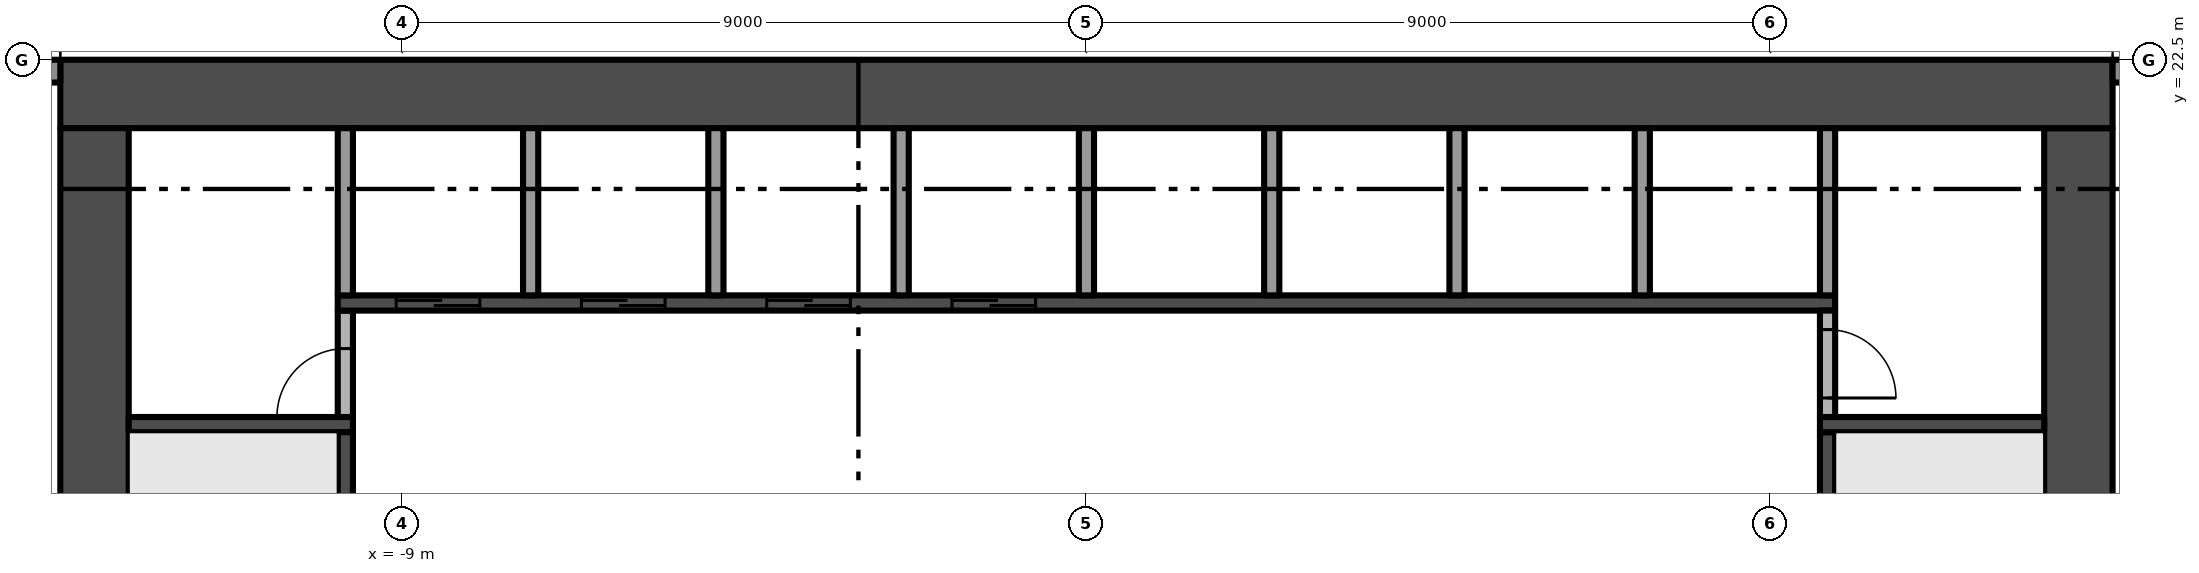
"""IFC4 building model, lengths in metres.
Left out: names, types, materials, properties, quantities, classifications, styles, units other than length and angle.
Written with IfcOpenShell. Run it as: python <this file> out.ifc"""

import sys

from ifc_helpers import new_model, si_unit, direction, frame, frame_2d, origin, place, context, subcontext, project, spatial, rectangle, extrude, element, fill, save


model = new_model("IFC4")
c1 = context("Model", 3, precision=1e-05, world=origin(), true_north=direction((0.0, 1.0)))
c2 = subcontext(c1, "Body", "Model", "MODEL_VIEW")
j1 = project(units=[si_unit("LENGTHUNIT", "METRE"), si_unit("PLANEANGLEUNIT", "RADIAN")], contexts=[c1])
p1 = place(None, origin())
s1 = spatial("IfcSite", under=j1, at=p1, CompositionType="ELEMENT")
p2 = place(p1, origin())
s2 = spatial("IfcBuilding", under=s1, at=p2, CompositionType="ELEMENT")
p3 = place(p2, frame((0.0, 0.0, 80.8)))
s3 = spatial("IfcBuildingStorey", under=s2, at=p3, CompositionType="ELEMENT", Elevation=80.8)
p4 = place(p3, frame((13.05, 5.4, -0.3), z_axis=(0.0, 0.0, 1.0), x_axis=(0.0, 1.0, 0.0)))
e1 = element("IfcWall", 1, at=p4, inside=s3, PredefinedType="SHEAR", context=c2, shape_type="SweptSolid", body=[
    extrude(rectangle(XDim=16.2, YDim=0.9, at=frame_2d((8.1, 0.0))), origin(), (0.0, 0.0, 1.0), 3.8),
])
p5 = place(p4, frame((6.0, 0.0, 0.3)))
e2 = element("IfcOpeningElement", 2, at=p5, cuts=e1, PredefinedType="OPENING", context=c2, shape_type="SweptSolid", body=[
    extrude(rectangle(XDim=1.2, YDim=2.2, at=frame_2d((0.6, 1.1))), frame((0.0, 0.46, 0.0), z_axis=(0.0, -1.0, 0.0), x_axis=(1.0, 0.0, 0.0)), (0.0, 0.0, 1.0), 0.92),
])
p6 = place(p3, frame((13.5, 22.05, -0.3), z_axis=(0.0, 0.0, 1.0), x_axis=(-1.0, 0.0, 0.0)))
e3 = element("IfcWall", 3, at=p6, inside=s3, PredefinedType="SHEAR", context=c2, shape_type="SweptSolid", body=[
    extrude(rectangle(XDim=27.0, YDim=0.9, at=frame_2d((13.5, 0.0))), origin(), (0.0, 0.0, 1.0), 3.8),
])
p7 = place(p3, frame((-13.05, 21.6, -0.3), z_axis=(0.0, 0.0, 1.0), x_axis=(0.0, -1.0, 0.0)))
e4 = element("IfcWall", 4, at=p7, inside=s3, PredefinedType="SHEAR", context=c2, shape_type="SweptSolid", body=[
    extrude(rectangle(XDim=16.2, YDim=0.9, at=frame_2d((8.1, 0.0))), origin(), (0.0, 0.0, 1.0), 3.8),
])
p8 = place(p7, frame((9.0, 0.0, 0.3)))
e5 = element("IfcOpeningElement", 5, at=p8, cuts=e4, PredefinedType="OPENING", context=c2, shape_type="SweptSolid", body=[
    extrude(rectangle(XDim=1.2, YDim=2.2, at=frame_2d((0.6, 1.1))), frame((0.0, 0.46, 0.0), z_axis=(0.0, -1.0, 0.0), x_axis=(1.0, 0.0, 0.0)), (0.0, 0.0, 1.0), 0.92),
])
p9 = place(p3, frame((13.5, 22.35, 0.0), z_axis=(0.0, 0.0, 1.0), x_axis=(1.0, 0.0, 0.0)))
e6 = element("IfcWall", 6, at=p9, inside=s3, PredefinedType="SOLIDWALL", context=c2, shape_type="SweptSolid", body=[
    extrude(rectangle(XDim=3.85, YDim=0.3, at=frame_2d((1.925, 0.0))), origin(), (0.0, 0.0, 1.0), 3.5),
])
p10 = place(p9, frame((0.775, 0.0, 0.45)))
e7 = element("IfcOpeningElement", 7, at=p10, cuts=e6, PredefinedType="OPENING", context=c2, shape_type="SweptSolid", body=[
    extrude(rectangle(XDim=2.775, YDim=2.65, at=frame_2d((1.387, 1.325))), frame((0.0, 0.16, 0.0), z_axis=(0.0, -1.0, 0.0), x_axis=(1.0, 0.0, 0.0)), (0.0, 0.0, 1.0), 0.32),
])
p11 = place(p3, frame((-17.35, 22.35, 0.0), z_axis=(0.0, 0.0, 1.0), x_axis=(1.0, 0.0, 0.0)))
e8 = element("IfcWall", 8, at=p11, inside=s3, PredefinedType="SOLIDWALL", context=c2, shape_type="SweptSolid", body=[
    extrude(rectangle(XDim=3.85, YDim=0.3, at=frame_2d((1.925, 0.0))), origin(), (0.0, 0.0, 1.0), 3.5),
])
p12 = place(p11, frame((0.3, 0.0, 0.0)))
e9 = element("IfcOpeningElement", 9, at=p12, cuts=e8, PredefinedType="OPENING", context=c2, shape_type="SweptSolid", body=[
    extrude(rectangle(XDim=2.775, YDim=2.4, at=frame_2d((1.387, 1.2))), frame((0.0, 0.16, 0.0), z_axis=(0.0, -1.0, 0.0), x_axis=(1.0, 0.0, 0.0)), (0.0, 0.0, 1.0), 0.32),
])
p13 = place(p3, frame((-12.6, 17.7, 0.0), z_axis=(0.0, 0.0, 1.0), x_axis=(1.0, 0.0, 0.0)))
e10 = element("IfcWall", 10, at=p13, inside=s3, PredefinedType="SHEAR", context=c2, shape_type="SweptSolid", body=[
    extrude(rectangle(XDim=2.95, YDim=0.2, at=frame_2d((1.475, 0.0))), origin(), (0.0, 0.0, 1.0), 3.5),
])
p14 = place(p3, frame((-9.75, 16.1, 0.0), z_axis=(0.0, 0.0, 1.0), x_axis=(0.0, 1.0, 0.0)))
e11 = element("IfcWall", 11, at=p14, inside=s3, PredefinedType="SHEAR", context=c2, shape_type="SweptSolid", body=[
    extrude(rectangle(XDim=1.5, YDim=0.2, at=frame_2d((0.75, 0.0))), origin(), (0.0, 0.0, 1.0), 3.5),
])
p15 = place(p3, frame((-9.75, 17.8, 0.0), z_axis=(0.0, 0.0, 1.0), x_axis=(0.0, 1.0, 0.0)))
e12 = element("IfcWall", 12, at=p15, inside=s3, PredefinedType="PARTITIONING", context=c2, shape_type="SweptSolid", body=[
    extrude(rectangle(XDim=1.4, YDim=0.2, at=frame_2d((0.7, 0.0))), origin(), (0.0, 0.0, 1.0), 3.5),
])
p16 = place(p15, origin())
e13 = element("IfcOpeningElement", 13, at=p16, cuts=e12, PredefinedType="OPENING", context=c2, shape_type="SweptSolid", body=[
    extrude(rectangle(XDim=0.9, YDim=2.1, at=frame_2d((0.45, 1.05))), frame((0.0, 0.11, 0.0), z_axis=(0.0, -1.0, 0.0), x_axis=(1.0, 0.0, 0.0)), (0.0, 0.0, 1.0), 0.22),
])
p17 = place(p3, frame((-9.85, 19.3, 0.0), z_axis=(0.0, 0.0, 1.0), x_axis=(1.0, 0.0, 0.0)))
e14 = element("IfcWall", 14, at=p17, inside=s3, PredefinedType="SHEAR", context=c2, shape_type="SweptSolid", body=[
    extrude(rectangle(XDim=19.7, YDim=0.2, at=frame_2d((9.85, 0.0))), origin(), (0.0, 0.0, 1.0), 3.5),
])
p18 = place(p17, frame((0.769, 0.0, 0.0)))
e15 = element("IfcOpeningElement", 15, at=p18, cuts=e14, PredefinedType="OPENING", context=c2, shape_type="SweptSolid", body=[
    extrude(rectangle(XDim=1.1, YDim=2.1, at=frame_2d((0.55, 1.05))), frame((0.0, 0.11, 0.0), z_axis=(0.0, -1.0, 0.0), x_axis=(1.0, 0.0, 0.0)), (0.0, 0.0, 1.0), 0.22),
])
p19 = place(p17, frame((3.206, 0.0, 0.0)))
e16 = element("IfcOpeningElement", 16, at=p19, cuts=e14, PredefinedType="OPENING", context=c2, shape_type="SweptSolid", body=[
    extrude(rectangle(XDim=1.1, YDim=2.1, at=frame_2d((0.55, 1.05))), frame((0.0, 0.11, 0.0), z_axis=(0.0, -1.0, 0.0), x_axis=(1.0, 0.0, 0.0)), (0.0, 0.0, 1.0), 0.22),
])
p20 = place(p17, frame((5.644, 0.0, 0.0)))
e17 = element("IfcOpeningElement", 17, at=p20, cuts=e14, PredefinedType="OPENING", context=c2, shape_type="SweptSolid", body=[
    extrude(rectangle(XDim=1.1, YDim=2.1, at=frame_2d((0.55, 1.05))), frame((0.0, 0.11, 0.0), z_axis=(0.0, -1.0, 0.0), x_axis=(1.0, 0.0, 0.0)), (0.0, 0.0, 1.0), 0.22),
])
p21 = place(p17, frame((8.081, 0.0, 0.0)))
e18 = element("IfcOpeningElement", 18, at=p21, cuts=e14, PredefinedType="OPENING", context=c2, shape_type="SweptSolid", body=[
    extrude(rectangle(XDim=1.1, YDim=2.1, at=frame_2d((0.55, 1.05))), frame((0.0, 0.11, 0.0), z_axis=(0.0, -1.0, 0.0), x_axis=(1.0, 0.0, 0.0)), (0.0, 0.0, 1.0), 0.22),
])
for number, where, z_axis, x_axis in (
    (19, (-9.75, 19.4, 0.0), (0.0, 0.0, 1.0), (0.0, 1.0, 0.0)),
    (20, (-7.312, 19.4, 0.0), (0.0, 0.0, 1.0), (0.0, 1.0, 0.0)),
    (21, (-4.875, 19.4, 0.0), (0.0, 0.0, 1.0), (0.0, 1.0, 0.0)),
    (22, (-2.438, 19.4, 0.0), (0.0, 0.0, 1.0), (0.0, 1.0, 0.0)),
    (23, (0.0, 19.4, 0.0), (0.0, 0.0, 1.0), (0.0, 1.0, 0.0)),
    (24, (2.438, 19.4, 0.0), (0.0, 0.0, 1.0), (0.0, 1.0, 0.0)),
    (25, (4.875, 19.4, 0.0), (0.0, 0.0, 1.0), (0.0, 1.0, 0.0)),
    (26, (7.312, 19.4, 0.0), (0.0, 0.0, 1.0), (0.0, 1.0, 0.0)),
):
    element("IfcWall", number, at=place(p3, frame(where, z_axis=z_axis, x_axis=x_axis)), inside=s3, PredefinedType="PARTITIONING", context=c2, shape_type="SweptSolid", body=[
        extrude(rectangle(XDim=2.2, YDim=0.2, at=frame_2d((1.1, 0.0))), origin(), (0.0, 0.0, 1.0), 3.5),
    ])
p22 = place(p3, frame((9.75, 16.1, 0.0), z_axis=(0.0, 0.0, 1.0), x_axis=(0.0, 1.0, 0.0)))
e27 = element("IfcWall", 27, at=p22, inside=s3, PredefinedType="SHEAR", context=c2, shape_type="SweptSolid", body=[
    extrude(rectangle(XDim=1.5, YDim=0.2, at=frame_2d((0.75, 0.0))), origin(), (0.0, 0.0, 1.0), 3.5),
])
p23 = place(p3, frame((9.65, 17.7, 0.0), z_axis=(0.0, 0.0, 1.0), x_axis=(1.0, 0.0, 0.0)))
e28 = element("IfcWall", 28, at=p23, inside=s3, PredefinedType="SHEAR", context=c2, shape_type="SweptSolid", body=[
    extrude(rectangle(XDim=2.95, YDim=0.2, at=frame_2d((1.475, 0.0))), origin(), (0.0, 0.0, 1.0), 3.5),
])
p24 = place(p3, frame((9.75, 19.2, 0.0), z_axis=(0.0, 0.0, 1.0), x_axis=(0.0, -1.0, 0.0)))
e29 = element("IfcWall", 29, at=p24, inside=s3, PredefinedType="PARTITIONING", context=c2, shape_type="SweptSolid", body=[
    extrude(rectangle(XDim=1.4, YDim=0.2, at=frame_2d((0.7, 0.0))), origin(), (0.0, 0.0, 1.0), 3.5),
])
p25 = place(p24, frame((0.25, 0.0, 0.0)))
e30 = element("IfcOpeningElement", 30, at=p25, cuts=e29, PredefinedType="OPENING", context=c2, shape_type="SweptSolid", body=[
    extrude(rectangle(XDim=0.9, YDim=2.1, at=frame_2d((0.45, 1.05))), frame((0.0, 0.11, 0.0), z_axis=(0.0, -1.0, 0.0), x_axis=(1.0, 0.0, 0.0)), (0.0, 0.0, 1.0), 0.22),
])
p26 = place(p3, frame((9.75, 19.4, 0.0), z_axis=(0.0, 0.0, 1.0), x_axis=(0.0, 1.0, 0.0)))
e31 = element("IfcWall", 31, at=p26, inside=s3, PredefinedType="PARTITIONING", context=c2, shape_type="SweptSolid", body=[
    extrude(rectangle(XDim=2.2, YDim=0.2, at=frame_2d((1.1, 0.0))), origin(), (0.0, 0.0, 1.0), 3.5),
])
p27 = place(p18, origin())
e32 = element("IfcDoor", 32, at=p27, inside=s3, OperationType="SLIDING_TO_LEFT", PredefinedType="DOOR", context=c2, shape_type="SweptSolid", body=[
    extrude(rectangle(XDim=1.1, YDim=2.1, at=frame_2d((0.55, 1.05))), frame((0.0, 0.025, 0.0), z_axis=(0.0, -1.0, 0.0), x_axis=(1.0, 0.0, 0.0)), (0.0, 0.0, 1.0), 0.05),
])
fill(e15, e32)
p28 = place(p19, origin())
e33 = element("IfcDoor", 33, at=p28, inside=s3, OperationType="SLIDING_TO_LEFT", PredefinedType="DOOR", context=c2, shape_type="SweptSolid", body=[
    extrude(rectangle(XDim=1.1, YDim=2.1, at=frame_2d((0.55, 1.05))), frame((0.0, 0.025, 0.0), z_axis=(0.0, -1.0, 0.0), x_axis=(1.0, 0.0, 0.0)), (0.0, 0.0, 1.0), 0.05),
])
fill(e16, e33)
p29 = place(p20, origin())
e34 = element("IfcDoor", 34, at=p29, inside=s3, OperationType="SLIDING_TO_LEFT", PredefinedType="DOOR", context=c2, shape_type="SweptSolid", body=[
    extrude(rectangle(XDim=1.1, YDim=2.1, at=frame_2d((0.55, 1.05))), frame((0.0, 0.025, 0.0), z_axis=(0.0, -1.0, 0.0), x_axis=(1.0, 0.0, 0.0)), (0.0, 0.0, 1.0), 0.05),
])
fill(e17, e34)
p30 = place(p21, origin())
e35 = element("IfcDoor", 35, at=p30, inside=s3, OperationType="SLIDING_TO_LEFT", PredefinedType="DOOR", context=c2, shape_type="SweptSolid", body=[
    extrude(rectangle(XDim=1.1, YDim=2.1, at=frame_2d((0.55, 1.05))), frame((0.0, 0.025, 0.0), z_axis=(0.0, -1.0, 0.0), x_axis=(1.0, 0.0, 0.0)), (0.0, 0.0, 1.0), 0.05),
])
fill(e18, e35)
p31 = place(p16, origin())
e36 = element("IfcDoor", 36, at=p31, inside=s3, OperationType="SINGLE_SWING_LEFT", PredefinedType="DOOR", context=c2, shape_type="SweptSolid", body=[
    extrude(rectangle(XDim=0.9, YDim=2.1, at=frame_2d((0.45, 1.05))), frame((0.0, 0.025, 0.0), z_axis=(0.0, -1.0, 0.0), x_axis=(1.0, 0.0, 0.0)), (0.0, 0.0, 1.0), 0.05),
])
fill(e13, e36)
p32 = place(p25, origin())
e37 = element("IfcDoor", 37, at=p32, inside=s3, OperationType="SINGLE_SWING_RIGHT", PredefinedType="DOOR", context=c2, shape_type="SweptSolid", body=[
    extrude(rectangle(XDim=0.9, YDim=2.1, at=frame_2d((0.45, 1.05))), frame((0.0, 0.025, 0.0), z_axis=(0.0, -1.0, 0.0), x_axis=(1.0, 0.0, 0.0)), (0.0, 0.0, 1.0), 0.05),
])
fill(e30, e37)
save(model, sys.argv[1])
